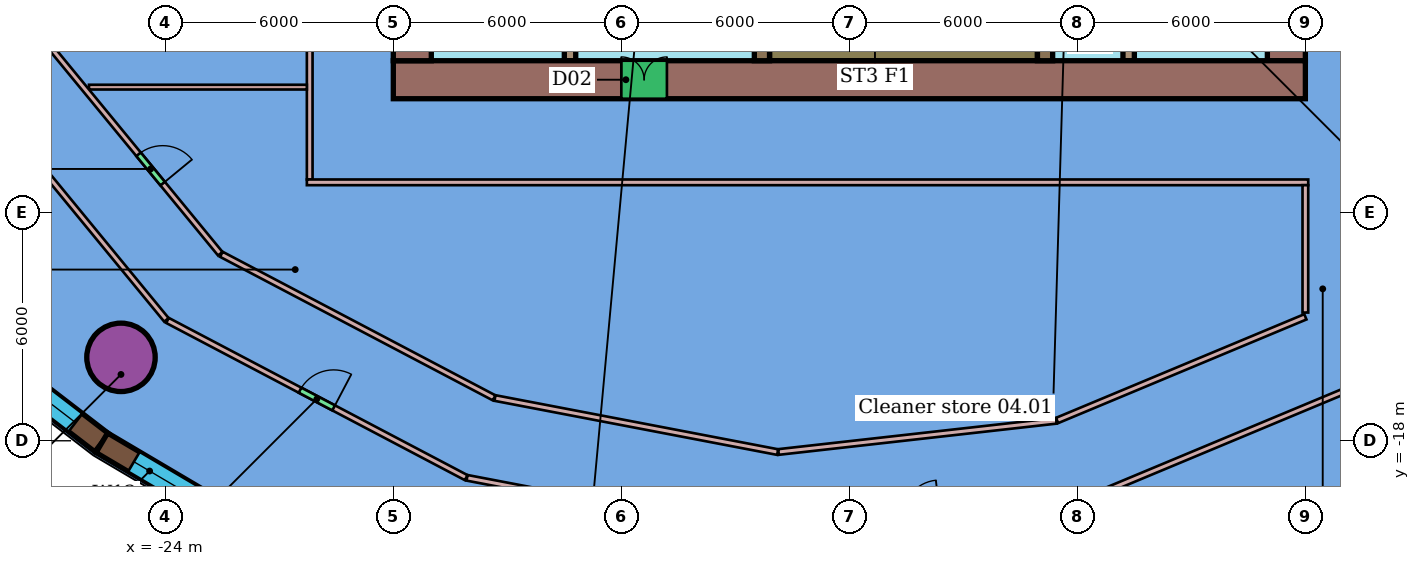
"""IFC4 building model, lengths in metres.
Left out: names, types, materials, properties, quantities, classifications, styles, units other than length and angle.
Written with IfcOpenShell. Run it as: python <this file> out.ifc"""

import sys

from ifc_helpers import new_model, si_unit, direction, frame, frame_2d, origin, origin_2d, place, context, subcontext, project, spatial, rectangle, hollow_circle, extrude, element, fill, save


model = new_model("IFC4")
c1 = context("Model", 3, precision=1e-05, world=origin(), true_north=direction((0.0, 1.0)))
c2 = subcontext(c1, "Body", "Model", "MODEL_VIEW")
j1 = project(units=[si_unit("LENGTHUNIT", "METRE"), si_unit("PLANEANGLEUNIT", "RADIAN")], contexts=[c1])
p1 = place(None, origin())
s1 = spatial("IfcSite", under=j1, at=p1, CompositionType="ELEMENT")
p2 = place(p1, origin())
s2 = spatial("IfcBuilding", under=s1, at=p2, CompositionType="ELEMENT")
p3 = place(p2, frame((0.0, 0.0, 31.5)))
s3 = spatial("IfcBuildingStorey", under=s2, at=p3, CompositionType="ELEMENT", Elevation=31.5)
p4 = place(p3, frame((-25.166, -15.805, 0.0), z_axis=(0.0, 0.0, 1.0), x_axis=(1.0, 0.0, 0.0)))
e1 = element("IfcColumn", 1, at=p4, inside=s3, PredefinedType="COLUMN", context=c2, shape_type="SweptSolid", body=[
    extrude(hollow_circle(Radius=0.9, WallThickness=0.06, at=origin_2d()), origin(), (0.0, 0.0, 1.0), 4.35),
])
p5 = place(p3, frame((-20.2, -11.125, 0.0), z_axis=(0.0, 0.0, 1.0), x_axis=(0.0, 1.0, 0.0)))
e2 = element("IfcWall", 2, at=p5, inside=s3, PredefinedType="PARTITIONING", context=c2, shape_type="SweptSolid", body=[
    extrude(rectangle(XDim=24.23, YDim=0.15, at=frame_2d((12.115, 0.0))), origin(), (0.0, 0.0, 1.0), 3.9),
])
p6 = place(p3, frame((-20.275, -11.2, 0.0), z_axis=(0.0, 0.0, 1.0), x_axis=(1.0, 0.0, 0.0)))
e3 = element("IfcWall", 3, at=p6, inside=s3, PredefinedType="PARTITIONING", context=c2, shape_type="SweptSolid", body=[
    extrude(rectangle(XDim=26.35, YDim=0.15, at=frame_2d((13.175, 0.0))), origin(), (0.0, 0.0, 1.0), 3.9),
])
p7 = place(p3, frame((6.0, -14.626, 0.0), z_axis=(0.0, 0.0, 1.0), x_axis=(0.0, 1.0, 0.0)))
e4 = element("IfcWall", 4, at=p7, inside=s3, PredefinedType="PARTITIONING", context=c2, shape_type="SweptSolid", body=[
    extrude(rectangle(XDim=3.351, YDim=0.15, at=frame_2d((1.676, 0.0))), origin(), (0.0, 0.0, 1.0), 3.9),
])
p8 = place(p3, frame((-26.008, -8.695, 0.0), z_axis=(0.0, 0.0, 1.0), x_axis=(1.0, 0.0, 0.0)))
e5 = element("IfcWall", 5, at=p8, inside=s3, PredefinedType="PARTITIONING", context=c2, shape_type="SweptSolid", body=[
    extrude(rectangle(XDim=5.733, YDim=0.125, at=frame_2d((2.867, 0.0))), origin(), (0.0, 0.0, 1.0), 3.9),
])
p9 = place(p3, frame((-27.959, -6.502, 0.0), z_axis=(0.0, 0.0, 1.0), x_axis=(0.635033534221, -0.772484569694, 0.0)))
e6 = element("IfcWall", 6, at=p9, inside=s3, PredefinedType="PARTITIONING", context=c2, shape_type="SweptSolid", body=[
    extrude(rectangle(XDim=8.513, YDim=0.15, at=frame_2d((4.257, 0.0))), origin(), (0.0, 0.0, 1.0), 3.9),
])
p10 = place(p9, frame((5.126, 0.0, 0.0)))
e7 = element("IfcOpeningElement", 7, at=p10, cuts=e6, PredefinedType="OPENING", context=c2, shape_type="SweptSolid", body=[
    extrude(rectangle(XDim=1.0, YDim=2.1, at=frame_2d((0.5, 1.05))), frame((0.0, 0.085, 0.0), z_axis=(0.0, -1.0, 0.0), x_axis=(1.0, 0.0, 0.0)), (0.0, 0.0, 1.0), 0.17),
])
p11 = place(p3, frame((-15.325, -16.875, 0.0), z_axis=(0.0, 0.0, 1.0), x_axis=(0.982205706766, -0.187808278828, 0.0)))
e8 = element("IfcWall", 8, at=p11, inside=s3, PredefinedType="PARTITIONING", context=c2, shape_type="SweptSolid", body=[
    extrude(rectangle(XDim=7.573, YDim=0.15, at=frame_2d((3.787, 0.0))), origin(), (0.0, 0.0, 1.0), 3.9),
])
p12 = place(p3, frame((-22.525, -13.094, 0.0), z_axis=(0.0, 0.0, 1.0), x_axis=(0.884926057807, -0.465731545221, 0.0)))
e9 = element("IfcWall", 9, at=p12, inside=s3, PredefinedType="PARTITIONING", context=c2, shape_type="SweptSolid", body=[
    extrude(rectangle(XDim=8.111, YDim=0.15, at=frame_2d((4.055, 0.0))), origin(), (0.0, 0.0, 1.0), 3.9),
])
p13 = place(p3, frame((-0.533, -17.466, 0.0), z_axis=(0.0, 0.0, 1.0), x_axis=(0.9228124679, 0.38524946345, 0.0)))
e10 = element("IfcWall", 10, at=p13, inside=s3, PredefinedType="PARTITIONING", context=c2, shape_type="SweptSolid", body=[
    extrude(rectangle(XDim=7.08, YDim=0.15, at=frame_2d((3.54, 0.0))), origin(), (0.0, 0.0, 1.0), 3.9),
])
p14 = place(p3, frame((-7.863, -18.295, 0.0), z_axis=(0.0, 0.0, 1.0), x_axis=(0.993762113274, 0.111520680692, 0.0)))
e11 = element("IfcWall", 11, at=p14, inside=s3, PredefinedType="PARTITIONING", context=c2, shape_type="SweptSolid", body=[
    extrude(rectangle(XDim=7.356, YDim=0.15, at=frame_2d((3.678, 0.0))), origin(), (0.0, 0.0, 1.0), 3.9),
])
p15 = place(p3, frame((-30.06, -7.411, 0.0), z_axis=(0.0, 0.0, 1.0), x_axis=(0.63502168635, -0.772494309277, 0.0)))
e12 = element("IfcWall", 12, at=p15, inside=s3, PredefinedType="PARTITIONING", context=c2, shape_type="SweptSolid", body=[
    extrude(rectangle(XDim=9.59, YDim=0.15, at=frame_2d((4.795, 0.0))), origin(), (0.0, 0.0, 1.0), 3.9),
])
p16 = place(p3, frame((-23.942, -14.833, 0.0), z_axis=(0.0, 0.0, 1.0), x_axis=(0.884920607371, -0.465741901326, 0.0)))
e13 = element("IfcWall", 13, at=p16, inside=s3, PredefinedType="PARTITIONING", context=c2, shape_type="SweptSolid", body=[
    extrude(rectangle(XDim=8.882, YDim=0.15, at=frame_2d((4.441, 0.0))), origin(), (0.0, 0.0, 1.0), 3.9),
])
p17 = place(p16, frame((3.941, 0.0, 0.0)))
e14 = element("IfcOpeningElement", 14, at=p17, cuts=e13, PredefinedType="OPENING", context=c2, shape_type="SweptSolid", body=[
    extrude(rectangle(XDim=1.0, YDim=2.1, at=frame_2d((0.5, 1.05))), frame((0.0, 0.085, 0.0), z_axis=(0.0, -1.0, 0.0), x_axis=(1.0, 0.0, 0.0)), (0.0, 0.0, 1.0), 0.17),
])
p18 = place(p3, frame((-16.06, -18.975, 0.0), z_axis=(0.0, 0.0, 1.0), x_axis=(0.982207009241, -0.187801466976, 0.0)))
e15 = element("IfcWall", 15, at=p18, inside=s3, PredefinedType="PARTITIONING", context=c2, shape_type="SweptSolid", body=[
    extrude(rectangle(XDim=8.234, YDim=0.15, at=frame_2d((4.117, 0.0))), origin(), (0.0, 0.0, 1.0), 3.9),
])
p19 = place(p3, frame((0.004, -19.626, 0.0), z_axis=(0.0, 0.0, 1.0), x_axis=(0.922818121352, 0.385235921097, 0.0)))
e16 = element("IfcWall", 16, at=p19, inside=s3, PredefinedType="PARTITIONING", context=c2, shape_type="SweptSolid", body=[
    extrude(rectangle(XDim=8.184, YDim=0.15, at=frame_2d((4.092, 0.0))), origin(), (0.0, 0.0, 1.0), 3.9),
])
p20 = place(p3, frame((-28.959, -15.527, 0.0), z_axis=(0.0, 0.0, 1.0), x_axis=(0.793065901338, -0.609135843745, 0.0)))
e17 = element("IfcWall", 17, at=p20, inside=s3, PredefinedType="SOLIDWALL", context=c2, shape_type="SweptSolid", body=[
    extrude(rectangle(XDim=4.147, YDim=0.6, at=frame_2d((2.073, 0.0))), origin(), (0.0, 0.0, 1.0), 4.35),
])
p21 = place(p20, frame((0.873, 0.0, 0.9)))
e18 = element("IfcOpeningElement", 18, at=p21, cuts=e17, PredefinedType="OPENING", context=c2, shape_type="SweptSolid", body=[
    extrude(rectangle(XDim=2.4, YDim=2.4, at=frame_2d((1.2, 1.2))), frame((0.0, 0.31, 0.0), z_axis=(0.0, -1.0, 0.0), x_axis=(1.0, 0.0, 0.0)), (0.0, 0.0, 1.0), 0.62),
])
p22 = place(p3, frame((-25.671, -18.053, 0.0), z_axis=(0.0, 0.0, 1.0), x_axis=(0.861017868942, -0.508574703818, 0.0)))
e19 = element("IfcWall", 19, at=p22, inside=s3, PredefinedType="SOLIDWALL", context=c2, shape_type="SweptSolid", body=[
    extrude(rectangle(XDim=4.363, YDim=0.6, at=frame_2d((2.181, 0.0))), origin(), (0.0, 0.0, 1.0), 4.35),
])
p23 = place(p22, frame((0.981, 0.0, 0.9)))
e20 = element("IfcOpeningElement", 20, at=p23, cuts=e19, PredefinedType="OPENING", context=c2, shape_type="SweptSolid", body=[
    extrude(rectangle(XDim=2.4, YDim=2.4, at=frame_2d((1.2, 1.2))), frame((0.0, 0.31, 0.0), z_axis=(0.0, -1.0, 0.0), x_axis=(1.0, 0.0, 0.0)), (0.0, 0.0, 1.0), 0.62),
])
p24 = place(p3, frame((-18.0, -8.5, 0.0), z_axis=(0.0, 0.0, 1.0), x_axis=(1.0, 0.0, 0.0)))
e21 = element("IfcWall", 21, at=p24, inside=s3, PredefinedType="SHEAR", context=c2, shape_type="SweptSolid", body=[
    extrude(rectangle(XDim=24.0, YDim=1.0, at=frame_2d((12.0, 0.0))), origin(), (0.0, 0.0, 1.0), 4.2),
])
p25 = place(p24, frame((6.0, 0.0, 0.0)))
e22 = element("IfcOpeningElement", 22, at=p25, cuts=e21, PredefinedType="OPENING", context=c2, shape_type="SweptSolid", body=[
    extrude(rectangle(XDim=1.2, YDim=2.1, at=frame_2d((0.6, 1.05))), frame((0.0, 0.51, 0.0), z_axis=(0.0, -1.0, 0.0), x_axis=(1.0, 0.0, 0.0)), (0.0, 0.0, 1.0), 1.02),
])
p26 = place(p3, frame((-17.5, 8.0, 0.0), z_axis=(0.0, 0.0, 1.0), x_axis=(0.0, -1.0, 0.0)))
e23 = element("IfcWall", 23, at=p26, inside=s3, PredefinedType="SHEAR", context=c2, shape_type="SweptSolid", body=[
    extrude(rectangle(XDim=16.0, YDim=1.0, at=frame_2d((8.0, 0.0))), origin(), (0.0, 0.0, 1.0), 4.2),
])
p27 = place(p26, frame((11.9, 0.0, 0.0)))
e24 = element("IfcOpeningElement", 24, at=p27, cuts=e23, PredefinedType="OPENING", context=c2, shape_type="SweptSolid", body=[
    extrude(rectangle(XDim=1.2, YDim=2.1, at=frame_2d((0.6, 1.05))), frame((0.0, 0.51, 0.0), z_axis=(0.0, -1.0, 0.0), x_axis=(1.0, 0.0, 0.0)), (0.0, 0.0, 1.0), 1.02),
])
p28 = place(p26, frame((2.9, 0.0, 0.0)))
e25 = element("IfcOpeningElement", 25, at=p28, cuts=e23, PredefinedType="OPENING", context=c2, shape_type="SweptSolid", body=[
    extrude(rectangle(XDim=1.2, YDim=2.1, at=frame_2d((0.6, 1.05))), frame((0.0, 0.51, 0.0), z_axis=(0.0, -1.0, 0.0), x_axis=(1.0, 0.0, 0.0)), (0.0, 0.0, 1.0), 1.02),
])
p29 = place(p3, frame((5.5, -8.0, 0.0), z_axis=(0.0, 0.0, 1.0), x_axis=(0.0, 1.0, 0.0)))
e26 = element("IfcWall", 26, at=p29, inside=s3, PredefinedType="SHEAR", context=c2, shape_type="SweptSolid", body=[
    extrude(rectangle(XDim=16.0, YDim=1.0, at=frame_2d((8.0, 0.0))), origin(), (0.0, 0.0, 1.0), 4.2),
])
p30 = place(p29, frame((2.9, 0.0, 0.0)))
e27 = element("IfcOpeningElement", 27, at=p30, cuts=e26, PredefinedType="OPENING", context=c2, shape_type="SweptSolid", body=[
    extrude(rectangle(XDim=1.2, YDim=2.1, at=frame_2d((0.6, 1.05))), frame((0.0, 0.51, 0.0), z_axis=(0.0, -1.0, 0.0), x_axis=(1.0, 0.0, 0.0)), (0.0, 0.0, 1.0), 1.02),
])
p31 = place(p29, frame((11.9, 0.0, 0.0)))
e28 = element("IfcOpeningElement", 28, at=p31, cuts=e26, PredefinedType="OPENING", context=c2, shape_type="SweptSolid", body=[
    extrude(rectangle(XDim=1.2, YDim=2.1, at=frame_2d((0.6, 1.05))), frame((0.0, 0.51, 0.0), z_axis=(0.0, -1.0, 0.0), x_axis=(1.0, 0.0, 0.0)), (0.0, 0.0, 1.0), 1.02),
])
p32 = place(p3, frame((-13.35, 8.0, 0.0), z_axis=(0.0, 0.0, 1.0), x_axis=(0.0, -1.0, 0.0)))
e29 = element("IfcWall", 29, at=p32, inside=s3, PredefinedType="SHEAR", context=c2, shape_type="SweptSolid", body=[
    extrude(rectangle(XDim=16.0, YDim=0.3, at=frame_2d((8.0, 0.0))), origin(), (0.0, 0.0, 1.0), 4.2),
])
p33 = place(p32, frame((7.25, 0.0, 0.0)))
e30 = element("IfcOpeningElement", 30, at=p33, cuts=e29, PredefinedType="OPENING", context=c2, shape_type="SweptSolid", body=[
    extrude(rectangle(XDim=1.5, YDim=2.1, at=frame_2d((0.75, 1.05))), frame((0.0, 0.16, 0.0), z_axis=(0.0, -1.0, 0.0), x_axis=(1.0, 0.0, 0.0)), (0.0, 0.0, 1.0), 0.32),
])
p34 = place(p3, frame((1.35, -8.0, 0.0), z_axis=(0.0, 0.0, 1.0), x_axis=(0.0, 1.0, 0.0)))
e31 = element("IfcWall", 31, at=p34, inside=s3, PredefinedType="SHEAR", context=c2, shape_type="SweptSolid", body=[
    extrude(rectangle(XDim=16.0, YDim=0.3, at=frame_2d((8.0, 0.0))), origin(), (0.0, 0.0, 1.0), 4.2),
])
p35 = place(p34, frame((1.91, 0.0, 0.0)))
e32 = element("IfcOpeningElement", 32, at=p35, cuts=e31, PredefinedType="OPENING", context=c2, shape_type="SweptSolid", body=[
    extrude(rectangle(XDim=1.0, YDim=2.1, at=frame_2d((0.5, 1.05))), frame((0.0, 0.16, 0.0), z_axis=(0.0, -1.0, 0.0), x_axis=(1.0, 0.0, 0.0)), (0.0, 0.0, 1.0), 0.32),
])
p36 = place(p34, frame((7.25, 0.0, 0.0)))
e33 = element("IfcOpeningElement", 33, at=p36, cuts=e31, PredefinedType="OPENING", context=c2, shape_type="SweptSolid", body=[
    extrude(rectangle(XDim=1.5, YDim=2.1, at=frame_2d((0.75, 1.05))), frame((0.0, 0.16, 0.0), z_axis=(0.0, -1.0, 0.0), x_axis=(1.0, 0.0, 0.0)), (0.0, 0.0, 1.0), 0.32),
])
p37 = place(p3, frame((-8.3, -3.88, 0.0), z_axis=(0.0, 0.0, 1.0), x_axis=(0.0, -1.0, 0.0)))
e34 = element("IfcWall", 34, at=p37, inside=s3, PredefinedType="SHEAR", context=c2, shape_type="SweptSolid", body=[
    extrude(rectangle(XDim=4.12, YDim=0.4, at=frame_2d((2.06, 0.0))), origin(), (0.0, 0.0, 1.0), 4.2),
])
p38 = place(p37, frame((1.11, 0.0, 0.0)))
e35 = element("IfcOpeningElement", 35, at=p38, cuts=e34, PredefinedType="OPENING", context=c2, shape_type="SweptSolid", body=[
    extrude(rectangle(XDim=1.2, YDim=2.1, at=frame_2d((0.6, 1.05))), frame((0.0, 0.21, 0.0), z_axis=(0.0, -1.0, 0.0), x_axis=(1.0, 0.0, 0.0)), (0.0, 0.0, 1.0), 0.42),
])
p39 = place(p3, frame((-0.85, -3.88, 0.0), z_axis=(0.0, 0.0, 1.0), x_axis=(0.0, -1.0, 0.0)))
e36 = element("IfcWall", 36, at=p39, inside=s3, PredefinedType="SHEAR", context=c2, shape_type="SweptSolid", body=[
    extrude(rectangle(XDim=4.12, YDim=0.4, at=frame_2d((2.06, 0.0))), origin(), (0.0, 0.0, 1.0), 4.2),
])
p40 = place(p3, frame((-8.1, -7.65, 0.0), z_axis=(0.0, 0.0, 1.0), x_axis=(1.0, 0.0, 0.0)))
e37 = element("IfcWall", 37, at=p40, inside=s3, PredefinedType="SHEAR", context=c2, shape_type="SweptSolid", body=[
    extrude(rectangle(XDim=7.05, YDim=0.7, at=frame_2d((3.525, 0.0))), origin(), (0.0, 0.0, 1.0), 4.2),
])
p41 = place(p10, origin())
e38 = element("IfcDoor", 38, at=p41, inside=s3, OperationType="SINGLE_SWING_RIGHT", PredefinedType="DOOR", context=c2, shape_type="SweptSolid", body=[
    extrude(rectangle(XDim=1.0, YDim=2.1, at=frame_2d((0.5, 1.05))), frame((0.0, 0.025, 0.0), z_axis=(0.0, -1.0, 0.0), x_axis=(1.0, 0.0, 0.0)), (0.0, 0.0, 1.0), 0.05),
])
fill(e7, e38)
p42 = place(p17, origin())
e39 = element("IfcDoor", 39, at=p42, inside=s3, OperationType="SINGLE_SWING_RIGHT", PredefinedType="DOOR", context=c2, shape_type="SweptSolid", body=[
    extrude(rectangle(XDim=1.0, YDim=2.1, at=frame_2d((0.5, 1.05))), frame((0.0, 0.025, 0.0), z_axis=(0.0, -1.0, 0.0), x_axis=(1.0, 0.0, 0.0)), (0.0, 0.0, 1.0), 0.05),
])
fill(e14, e39)
p43 = place(p21, origin())
e40 = element("IfcWindow", 40, at=p43, inside=s3, PartitioningType="SINGLE_PANEL", PredefinedType="WINDOW", context=c2, shape_type="SweptSolid", body=[
    extrude(rectangle(XDim=2.4, YDim=2.4, at=frame_2d((1.2, 1.2))), frame((0.0, 0.03, 0.0), z_axis=(0.0, -1.0, 0.0), x_axis=(1.0, 0.0, 0.0)), (0.0, 0.0, 1.0), 0.06),
])
fill(e18, e40)
p44 = place(p23, origin())
e41 = element("IfcWindow", 41, at=p44, inside=s3, PartitioningType="SINGLE_PANEL", PredefinedType="WINDOW", context=c2, shape_type="SweptSolid", body=[
    extrude(rectangle(XDim=2.4, YDim=2.4, at=frame_2d((1.2, 1.2))), frame((0.0, 0.03, 0.0), z_axis=(0.0, -1.0, 0.0), x_axis=(1.0, 0.0, 0.0)), (0.0, 0.0, 1.0), 0.06),
])
fill(e20, e41)
p45 = place(p25, origin())
e42 = element("IfcDoor", 42, at=p45, inside=s3, OperationType="DOUBLE_DOOR_SINGLE_SWING", PredefinedType="NOTDEFINED", context=c2, shape_type="SweptSolid", body=[
    extrude(rectangle(XDim=1.2, YDim=2.1, at=frame_2d((0.6, 1.05))), frame((0.0, 0.025, 0.0), z_axis=(0.0, -1.0, 0.0), x_axis=(1.0, 0.0, 0.0)), (0.0, 0.0, 1.0), 0.05),
])
fill(e22, e42)
save(model, sys.argv[1])
